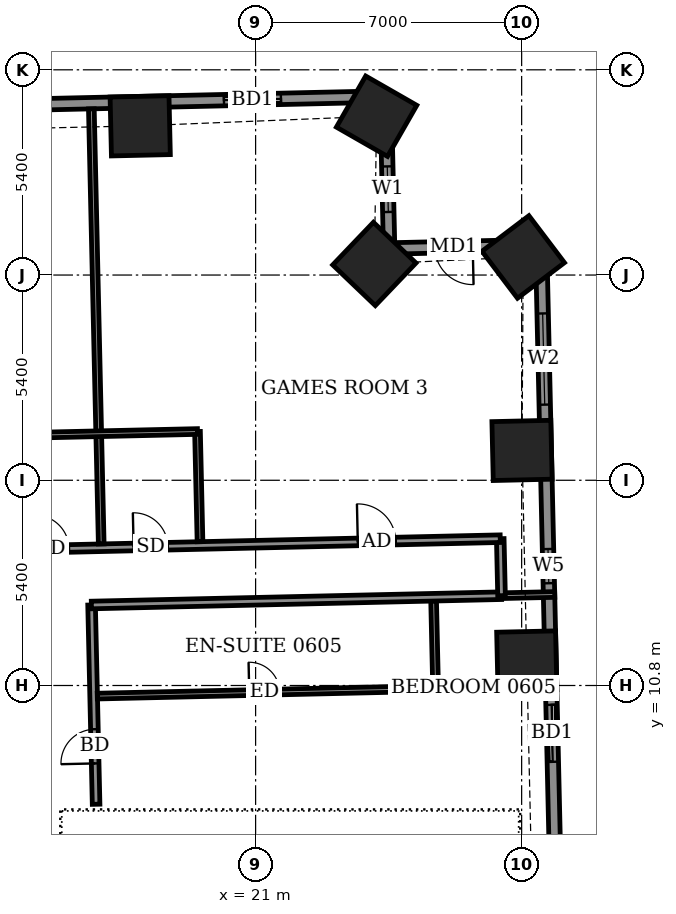
"""IFC4 building model, lengths in metres.
Left out: names, types, materials, properties, quantities, classifications, styles, units other than length and angle.
Written with IfcOpenShell. Run it as: python <this file> out.ifc"""

import sys

from ifc_helpers import new_model, si_unit, direction, frame, frame_2d, origin, origin_2d, place, context, subcontext, project, spatial, rectangle, extrude, element, fill, save


model = new_model("IFC4")
c1 = context("Model", 3, precision=1e-05, world=origin(), true_north=direction((0.0, 1.0)))
c2 = subcontext(c1, "Body", "Model", "MODEL_VIEW")
j1 = project(units=[si_unit("LENGTHUNIT", "METRE"), si_unit("PLANEANGLEUNIT", "RADIAN")], contexts=[c1])
p1 = place(None, origin())
s1 = spatial("IfcSite", under=j1, at=p1, CompositionType="ELEMENT")
p2 = place(p1, origin())
s2 = spatial("IfcBuilding", under=s1, at=p2, CompositionType="ELEMENT")
p3 = place(p2, frame((0.0, 0.0, 29.5)))
s3 = spatial("IfcBuildingStorey", under=s2, at=p3, CompositionType="ELEMENT", Elevation=29.5)
for number, where, z_axis, x_axis in (
    (1, (28.135, 11.444, -0.55), (0.0, 0.0, 1.0), (-0.023, 1.0, 0.0)),
    (2, (28.01, 16.985, -0.55), (0.0, 0.0, 1.0), (-0.023, 1.0, 0.0)),
    (3, (28.041, 22.075, -0.55), (0.0, 0.0, 1.0), (-0.604, 0.797, 0.0)),
    (4, (24.125, 21.892, -0.55), (0.0, 0.0, 1.0), (-0.723, 0.691, 0.0)),
    (5, (24.184, 25.779, -0.55), (0.0, 0.0, 1.0), (-0.868, 0.497, 0.0)),
    (6, (17.964, 25.526, -0.55), (0.0, 0.0, 1.0), (-1.0, -0.023, 0.0)),
):
    element("IfcColumn", number, at=place(p3, frame(where, z_axis=z_axis, x_axis=x_axis)), inside=s3, PredefinedType="COLUMN", context=c2, shape_type="SweptSolid", body=[
        extrude(rectangle(XDim=1.55, YDim=1.55, at=origin_2d()), origin(), (0.0, 0.0, 1.0), 4.6),
    ])
p4 = place(p3, frame((28.887, 5.864, 0.0), z_axis=(0.0, 0.0, 1.0), x_axis=(-0.022687182773, 0.999742612745, 0.0)))
e7 = element("IfcWall", 7, at=p4, inside=s3, PredefinedType="SOLIDWALL", context=c2, shape_type="SweptSolid", body=[
    extrude(rectangle(XDim=16.529, YDim=0.3, at=frame_2d((8.265, 0.0))), origin(), (0.0, 0.0, 1.0), 4.05),
])
p5 = place(p4, frame((2.929, 0.0, 0.0)))
e8 = element("IfcOpeningElement", 8, at=p5, cuts=e7, PredefinedType="OPENING", context=c2, shape_type="SweptSolid", body=[
    extrude(rectangle(XDim=1.5, YDim=2.4, at=frame_2d((0.75, 1.2))), frame((0.0, 0.16, 0.0), z_axis=(0.0, -1.0, 0.0), x_axis=(1.0, 0.0, 0.0)), (0.0, 0.0, 1.0), 0.32),
])
p6 = place(p4, frame((7.629, 0.0, 0.9)))
e9 = element("IfcOpeningElement", 9, at=p6, cuts=e7, PredefinedType="OPENING", context=c2, shape_type="SweptSolid", body=[
    extrude(rectangle(XDim=0.9, YDim=1.5, at=frame_2d((0.45, 0.75))), frame((0.0, 0.16, 0.0), z_axis=(0.0, -1.0, 0.0), x_axis=(1.0, 0.0, 0.0)), (0.0, 0.0, 1.0), 0.32),
])
p7 = place(p4, frame((12.329, 0.0, 0.9)))
e10 = element("IfcOpeningElement", 10, at=p7, cuts=e7, PredefinedType="OPENING", context=c2, shape_type="SweptSolid", body=[
    extrude(rectangle(XDim=2.4, YDim=1.5, at=frame_2d((1.2, 0.75))), frame((0.0, 0.16, 0.0), z_axis=(0.0, -1.0, 0.0), x_axis=(1.0, 0.0, 0.0)), (0.0, 0.0, 1.0), 0.32),
])
p8 = place(p3, frame((28.512, 22.389, 0.0), z_axis=(0.0, 0.0, 1.0), x_axis=(-0.999747725427, -0.022460754759, 0.0)))
e11 = element("IfcWall", 11, at=p8, inside=s3, PredefinedType="SOLIDWALL", context=c2, shape_type="SweptSolid", body=[
    extrude(rectangle(XDim=4.0, YDim=0.3, at=frame_2d((2.0, 0.0))), origin(), (0.0, 0.0, 1.0), 3.55),
])
p9 = place(p8, frame((1.8, 0.0, 0.0)))
e12 = element("IfcOpeningElement", 12, at=p9, cuts=e11, PredefinedType="OPENING", context=c2, shape_type="SweptSolid", body=[
    extrude(rectangle(XDim=1.0, YDim=2.1, at=frame_2d((0.5, 1.05))), frame((0.0, 0.16, 0.0), z_axis=(0.0, -1.0, 0.0), x_axis=(1.0, 0.0, 0.0)), (0.0, 0.0, 1.0), 0.32),
])
p10 = place(p3, frame((24.513, 22.299, 0.0), z_axis=(0.0, 0.0, 1.0), x_axis=(-0.022460754759, 0.999747725427, 0.0)))
e13 = element("IfcWall", 13, at=p10, inside=s3, PredefinedType="SOLIDWALL", context=c2, shape_type="SweptSolid", body=[
    extrude(rectangle(XDim=4.0, YDim=0.3, at=frame_2d((2.0, 0.0))), origin(), (0.0, 0.0, 1.0), 3.55),
])
p11 = place(p10, frame((0.96, 0.0, 0.9)))
e14 = element("IfcOpeningElement", 14, at=p11, cuts=e13, PredefinedType="OPENING", context=c2, shape_type="SweptSolid", body=[
    extrude(rectangle(XDim=1.2, YDim=1.5, at=frame_2d((0.6, 0.75))), frame((0.0, 0.16, 0.0), z_axis=(0.0, -1.0, 0.0), x_axis=(1.0, 0.0, 0.0)), (0.0, 0.0, 1.0), 0.32),
])
p12 = place(p3, frame((24.423, 26.298, 0.0), z_axis=(0.0, 0.0, 1.0), x_axis=(-0.999742433108, -0.022695097355, 0.0)))
e15 = element("IfcWall", 15, at=p12, inside=s3, PredefinedType="SOLIDWALL", context=c2, shape_type="SweptSolid", body=[
    extrude(rectangle(XDim=52.701, YDim=0.3, at=frame_2d((26.35, 0.0))), origin(), (0.0, 0.0, 1.0), 4.05),
])
p13 = place(p12, frame((2.757, 0.0, 0.0)))
e16 = element("IfcOpeningElement", 16, at=p13, cuts=e15, PredefinedType="OPENING", context=c2, shape_type="SweptSolid", body=[
    extrude(rectangle(XDim=1.5, YDim=2.4, at=frame_2d((0.75, 1.2))), frame((0.0, 0.16, 0.0), z_axis=(0.0, -1.0, 0.0), x_axis=(1.0, 0.0, 0.0)), (0.0, 0.0, 1.0), 0.32),
])
p14 = place(p12, frame((8.937, 0.0, 0.9)))
e17 = element("IfcOpeningElement", 17, at=p14, cuts=e15, PredefinedType="OPENING", context=c2, shape_type="SweptSolid", body=[
    extrude(rectangle(XDim=2.4, YDim=1.5, at=frame_2d((1.2, 0.75))), frame((0.0, 0.16, 0.0), z_axis=(0.0, -1.0, 0.0), x_axis=(1.0, 0.0, 0.0)), (0.0, 0.0, 1.0), 0.32),
])
p15 = place(p12, frame((16.675, 0.0, 0.0)))
e18 = element("IfcOpeningElement", 18, at=p15, cuts=e15, PredefinedType="OPENING", context=c2, shape_type="SweptSolid", body=[
    extrude(rectangle(XDim=1.5, YDim=2.4, at=frame_2d((0.75, 1.2))), frame((0.0, 0.16, 0.0), z_axis=(0.0, -1.0, 0.0), x_axis=(1.0, 0.0, 0.0)), (0.0, 0.0, 1.0), 0.32),
])
p16 = place(p12, frame((22.5, 0.0, 0.0)))
e19 = element("IfcOpeningElement", 19, at=p16, cuts=e15, PredefinedType="OPENING", context=c2, shape_type="SweptSolid", body=[
    extrude(rectangle(XDim=1.5, YDim=2.4, at=frame_2d((0.75, 1.2))), frame((0.0, 0.16, 0.0), z_axis=(0.0, -1.0, 0.0), x_axis=(1.0, 0.0, 0.0)), (0.0, 0.0, 1.0), 0.32),
])
p17 = place(p12, frame((28.113, 0.0, 0.0)))
e20 = element("IfcOpeningElement", 20, at=p17, cuts=e15, PredefinedType="OPENING", context=c2, shape_type="SweptSolid", body=[
    extrude(rectangle(XDim=1.5, YDim=2.4, at=frame_2d((0.75, 1.2))), frame((0.0, 0.16, 0.0), z_axis=(0.0, -1.0, 0.0), x_axis=(1.0, 0.0, 0.0)), (0.0, 0.0, 1.0), 0.32),
])
p18 = place(p12, frame((34.1, 0.0, 0.9)))
e21 = element("IfcOpeningElement", 21, at=p18, cuts=e15, PredefinedType="OPENING", context=c2, shape_type="SweptSolid", body=[
    extrude(rectangle(XDim=2.4, YDim=1.5, at=frame_2d((1.2, 0.75))), frame((0.0, 0.16, 0.0), z_axis=(0.0, -1.0, 0.0), x_axis=(1.0, 0.0, 0.0)), (0.0, 0.0, 1.0), 0.32),
])
p19 = place(p12, frame((41.363, 0.0, 0.9)))
e22 = element("IfcOpeningElement", 22, at=p19, cuts=e15, PredefinedType="OPENING", context=c2, shape_type="SweptSolid", body=[
    extrude(rectangle(XDim=2.4, YDim=1.5, at=frame_2d((1.2, 0.75))), frame((0.0, 0.16, 0.0), z_axis=(0.0, -1.0, 0.0), x_axis=(1.0, 0.0, 0.0)), (0.0, 0.0, 1.0), 0.32),
])
p20 = place(p12, frame((47.965, 0.0, 0.9)))
e23 = element("IfcOpeningElement", 23, at=p20, cuts=e15, PredefinedType="OPENING", context=c2, shape_type="SweptSolid", body=[
    extrude(rectangle(XDim=2.4, YDim=1.5, at=frame_2d((1.2, 0.75))), frame((0.0, 0.16, 0.0), z_axis=(0.0, -1.0, 0.0), x_axis=(1.0, 0.0, 0.0)), (0.0, 0.0, 1.0), 0.32),
])
p21 = place(p3, frame((30.037, 19.073, 0.0), z_axis=(0.0, 0.0, 1.0), x_axis=(-0.022600979566, 0.999744565238, 0.0)))
e24 = element("IfcWall", 24, at=p21, inside=s3, PredefinedType="USERDEFINED", context=c2, shape_type="SweptSolid", body=[
    extrude(rectangle(XDim=3.5, YDim=0.55, at=frame_2d((1.75, 0.0))), origin(), (0.0, 0.0, 1.0), 0.8),
])
p22 = place(p3, frame((28.3, 30.313, 0.0), z_axis=(0.0, 0.0, 1.0), x_axis=(0.707106781187, -0.707106781187, 0.0)))
e25 = element("IfcWall", 25, at=p22, inside=s3, PredefinedType="USERDEFINED", context=c2, shape_type="SweptSolid", body=[
    extrude(rectangle(XDim=10.201, YDim=0.55, at=frame_2d((5.1, 0.0))), origin(), (0.0, 0.0, 1.0), 0.8),
])
p23 = place(p3, frame((16.803, 7.675, 0.0), z_axis=(0.0, 0.0, 1.0), x_axis=(-0.022667483124, 0.999743059595, 0.0)))
e26 = element("IfcWall", 26, at=p23, inside=s3, PredefinedType="PARTITIONING", context=c2, shape_type="SweptSolid", body=[
    extrude(rectangle(XDim=5.245, YDim=0.2, at=frame_2d((2.623, 0.0))), origin(), (0.0, 0.0, 1.0), 4.05),
])
p24 = place(p23, frame((1.075, 0.0, 0.0)))
e27 = element("IfcOpeningElement", 27, at=p24, cuts=e26, PredefinedType="OPENING", context=c2, shape_type="SweptSolid", body=[
    extrude(rectangle(XDim=0.9, YDim=2.1, at=frame_2d((0.45, 1.05))), frame((0.0, 0.11, 0.0), z_axis=(0.0, -1.0, 0.0), x_axis=(1.0, 0.0, 0.0)), (0.0, 0.0, 1.0), 0.22),
])
p25 = place(p3, frame((16.834, 10.521, 0.0), z_axis=(0.0, 0.0, 1.0), x_axis=(0.999742599783, 0.022687753966, 0.0)))
e28 = element("IfcWall", 28, at=p25, inside=s3, PredefinedType="PARTITIONING", context=c2, shape_type="SweptSolid", body=[
    extrude(rectangle(XDim=8.899, YDim=0.15, at=frame_2d((4.45, 0.0))), origin(), (0.0, 0.0, 1.0), 4.05),
])
p26 = place(p25, frame((4.0, 0.0, 0.0)))
e29 = element("IfcOpeningElement", 29, at=p26, cuts=e28, PredefinedType="OPENING", context=c2, shape_type="SweptSolid", body=[
    extrude(rectangle(XDim=0.8, YDim=2.1, at=frame_2d((0.4, 1.05))), frame((0.0, 0.085, 0.0), z_axis=(0.0, -1.0, 0.0), x_axis=(1.0, 0.0, 0.0)), (0.0, 0.0, 1.0), 0.17),
])
p27 = place(p3, frame((25.736, 10.723, 0.0), z_axis=(0.0, 0.0, 1.0), x_axis=(-0.022603288534, 0.999744513037, 0.0)))
e30 = element("IfcWall", 30, at=p27, inside=s3, PredefinedType="PARTITIONING", context=c2, shape_type="SweptSolid", body=[
    extrude(rectangle(XDim=2.301, YDim=0.15, at=frame_2d((1.15, 0.0))), origin(), (0.0, 0.0, 1.0), 4.05),
])
p28 = place(p3, frame((16.679, 12.918, 0.0), z_axis=(0.0, 0.0, 1.0), x_axis=(0.999742162372, 0.022707020428, 0.0)))
e31 = element("IfcWall", 31, at=p28, inside=s3, PredefinedType="PARTITIONING", context=c2, shape_type="SweptSolid", body=[
    extrude(rectangle(XDim=10.795, YDim=0.2, at=frame_2d((5.397, 0.0))), origin(), (0.0, 0.0, 1.0), 4.05),
])
p29 = place(p3, frame((27.471, 13.163, 0.0), z_axis=(0.0, 0.0, 1.0), x_axis=(0.999739219063, 0.022836240226, 0.0)))
e32 = element("IfcWall", 32, at=p29, inside=s3, PredefinedType="PARTITIONING", context=c2, shape_type="SweptSolid", body=[
    extrude(rectangle(XDim=1.4, YDim=0.15, at=frame_2d((0.7, 0.0))), origin(), (0.0, 0.0, 1.0), 3.55),
])
p30 = place(p3, frame((27.471, 13.163, 0.0), z_axis=(0.0, 0.0, 1.0), x_axis=(-0.022617910375, 0.999744182344, 0.0)))
e33 = element("IfcWall", 33, at=p30, inside=s3, PredefinedType="PARTITIONING", context=c2, shape_type="SweptSolid", body=[
    extrude(rectangle(XDim=1.5, YDim=0.2, at=frame_2d((0.75, 0.0))), origin(), (0.0, 0.0, 1.0), 4.05),
])
p31 = place(p3, frame((-31.347, 13.329, 0.0), z_axis=(0.0, 0.0, 1.0), x_axis=(0.999742613079, 0.022687168058, 0.0)))
e34 = element("IfcWall", 34, at=p31, inside=s3, PredefinedType="PARTITIONING", context=c2, shape_type="SweptSolid", body=[
    extrude(rectangle(XDim=58.799, YDim=0.2, at=frame_2d((29.399, 0.0))), origin(), (0.0, 0.0, 1.0), 4.05),
])
p32 = place(p31, frame((55.05, 0.0, 0.0)))
e35 = element("IfcOpeningElement", 35, at=p32, cuts=e34, PredefinedType="OPENING", context=c2, shape_type="SweptSolid", body=[
    extrude(rectangle(XDim=1.0, YDim=2.1, at=frame_2d((0.5, 1.05))), frame((0.0, 0.11, 0.0), z_axis=(0.0, -1.0, 0.0), x_axis=(1.0, 0.0, 0.0)), (0.0, 0.0, 1.0), 0.22),
])
p33 = place(p31, frame((49.15, 0.0, 0.0)))
e36 = element("IfcOpeningElement", 36, at=p33, cuts=e34, PredefinedType="OPENING", context=c2, shape_type="SweptSolid", body=[
    extrude(rectangle(XDim=0.9, YDim=2.1, at=frame_2d((0.45, 1.05))), frame((0.0, 0.11, 0.0), z_axis=(0.0, -1.0, 0.0), x_axis=(1.0, 0.0, 0.0)), (0.0, 0.0, 1.0), 0.22),
])
p34 = place(p31, frame((42.55, 0.0, 0.0)))
e37 = element("IfcOpeningElement", 37, at=p34, cuts=e34, PredefinedType="OPENING", context=c2, shape_type="SweptSolid", body=[
    extrude(rectangle(XDim=1.0, YDim=2.1, at=frame_2d((0.5, 1.05))), frame((0.0, 0.11, 0.0), z_axis=(0.0, -1.0, 0.0), x_axis=(1.0, 0.0, 0.0)), (0.0, 0.0, 1.0), 0.22),
])
p35 = place(p31, frame((46.55, 0.0, 0.0)))
e38 = element("IfcOpeningElement", 38, at=p35, cuts=e34, PredefinedType="OPENING", context=c2, shape_type="SweptSolid", body=[
    extrude(rectangle(XDim=0.9, YDim=2.1, at=frame_2d((0.45, 1.05))), frame((0.0, 0.11, 0.0), z_axis=(0.0, -1.0, 0.0), x_axis=(1.0, 0.0, 0.0)), (0.0, 0.0, 1.0), 0.22),
])
p36 = place(p31, frame((38.625, 0.0, 0.0)))
e39 = element("IfcOpeningElement", 39, at=p36, cuts=e34, PredefinedType="OPENING", context=c2, shape_type="SweptSolid", body=[
    extrude(rectangle(XDim=0.9, YDim=2.1, at=frame_2d((0.45, 1.05))), frame((0.0, 0.11, 0.0), z_axis=(0.0, -1.0, 0.0), x_axis=(1.0, 0.0, 0.0)), (0.0, 0.0, 1.0), 0.22),
])
p37 = place(p31, frame((31.15, 0.0, 0.0)))
e40 = element("IfcOpeningElement", 40, at=p37, cuts=e34, PredefinedType="OPENING", context=c2, shape_type="SweptSolid", body=[
    extrude(rectangle(XDim=0.9, YDim=2.1, at=frame_2d((0.45, 1.05))), frame((0.0, 0.11, 0.0), z_axis=(0.0, -1.0, 0.0), x_axis=(1.0, 0.0, 0.0)), (0.0, 0.0, 1.0), 0.22),
])
p38 = place(p31, frame((28.475, 0.0, 0.0)))
e41 = element("IfcOpeningElement", 41, at=p38, cuts=e34, PredefinedType="OPENING", context=c2, shape_type="SweptSolid", body=[
    extrude(rectangle(XDim=0.9, YDim=2.1, at=frame_2d((0.45, 1.05))), frame((0.0, 0.11, 0.0), z_axis=(0.0, -1.0, 0.0), x_axis=(1.0, 0.0, 0.0)), (0.0, 0.0, 1.0), 0.22),
])
p39 = place(p31, frame((21.6, 0.0, 0.0)))
e42 = element("IfcOpeningElement", 42, at=p39, cuts=e34, PredefinedType="OPENING", context=c2, shape_type="SweptSolid", body=[
    extrude(rectangle(XDim=1.0, YDim=2.1, at=frame_2d((0.5, 1.05))), frame((0.0, 0.11, 0.0), z_axis=(0.0, -1.0, 0.0), x_axis=(1.0, 0.0, 0.0)), (0.0, 0.0, 1.0), 0.22),
])
p40 = place(p31, frame((15.85, 0.0, 0.0)))
e43 = element("IfcOpeningElement", 43, at=p40, cuts=e34, PredefinedType="OPENING", context=c2, shape_type="SweptSolid", body=[
    extrude(rectangle(XDim=1.0, YDim=2.1, at=frame_2d((0.5, 1.05))), frame((0.0, 0.11, 0.0), z_axis=(0.0, -1.0, 0.0), x_axis=(1.0, 0.0, 0.0)), (0.0, 0.0, 1.0), 0.22),
])
p41 = place(p31, frame((11.95, 0.0, 0.0)))
e44 = element("IfcOpeningElement", 44, at=p41, cuts=e34, PredefinedType="OPENING", context=c2, shape_type="SweptSolid", body=[
    extrude(rectangle(XDim=0.9, YDim=2.1, at=frame_2d((0.45, 1.05))), frame((0.0, 0.11, 0.0), z_axis=(0.0, -1.0, 0.0), x_axis=(1.0, 0.0, 0.0)), (0.0, 0.0, 1.0), 0.22),
])
p42 = place(p31, frame((3.15, 0.0, 0.0)))
e45 = element("IfcOpeningElement", 45, at=p42, cuts=e34, PredefinedType="OPENING", context=c2, shape_type="SweptSolid", body=[
    extrude(rectangle(XDim=1.0, YDim=2.1, at=frame_2d((0.5, 1.05))), frame((0.0, 0.11, 0.0), z_axis=(0.0, -1.0, 0.0), x_axis=(1.0, 0.0, 0.0)), (0.0, 0.0, 1.0), 0.22),
])
p43 = place(p31, frame((9.45, 0.0, 0.0)))
e46 = element("IfcOpeningElement", 46, at=p43, cuts=e34, PredefinedType="OPENING", context=c2, shape_type="SweptSolid", body=[
    extrude(rectangle(XDim=0.9, YDim=2.1, at=frame_2d((0.45, 1.05))), frame((0.0, 0.11, 0.0), z_axis=(0.0, -1.0, 0.0), x_axis=(1.0, 0.0, 0.0)), (0.0, 0.0, 1.0), 0.22),
])
p44 = place(p3, frame((16.938, 14.525, 0.0), z_axis=(0.0, 0.0, 1.0), x_axis=(-0.022708327922, 0.999742132674, 0.0)))
e47 = element("IfcWall", 47, at=p44, inside=s3, PredefinedType="PARTITIONING", context=c2, shape_type="SweptSolid", body=[
    extrude(rectangle(XDim=11.45, YDim=0.15, at=frame_2d((5.725, 0.0))), origin(), (0.0, 0.0, 1.0), 3.55),
])
p45 = place(p3, frame((19.537, 14.584, 0.0), z_axis=(0.0, 0.0, 1.0), x_axis=(-0.022817032779, 0.999739657619, 0.0)))
e48 = element("IfcWall", 48, at=p45, inside=s3, PredefinedType="PARTITIONING", context=c2, shape_type="SweptSolid", body=[
    extrude(rectangle(XDim=2.9, YDim=0.15, at=frame_2d((1.45, 0.0))), origin(), (0.0, 0.0, 1.0), 4.05),
])
p46 = place(p3, frame((14.273, 17.365, 0.0), z_axis=(0.0, 0.0, 1.0), x_axis=(0.999742780105, 0.022679806622, 0.0)))
e49 = element("IfcWall", 49, at=p46, inside=s3, PredefinedType="PARTITIONING", context=c2, shape_type="SweptSolid", body=[
    extrude(rectangle(XDim=5.199, YDim=0.15, at=frame_2d((2.6, 0.0))), origin(), (0.0, 0.0, 1.0), 4.05),
])
p47 = place(p5, origin())
e50 = element("IfcDoor", 50, at=p47, inside=s3, OperationType="SLIDING_TO_LEFT", PredefinedType="DOOR", context=c2, shape_type="SweptSolid", body=[
    extrude(rectangle(XDim=1.5, YDim=2.4, at=frame_2d((0.75, 1.2))), frame((0.0, 0.025, 0.0), z_axis=(0.0, -1.0, 0.0), x_axis=(1.0, 0.0, 0.0)), (0.0, 0.0, 1.0), 0.05),
])
fill(e8, e50)
p48 = place(p6, origin())
e51 = element("IfcWindow", 51, at=p48, inside=s3, PartitioningType="SINGLE_PANEL", PredefinedType="WINDOW", context=c2, shape_type="SweptSolid", body=[
    extrude(rectangle(XDim=0.9, YDim=1.5, at=frame_2d((0.45, 0.75))), frame((0.0, 0.03, 0.0), z_axis=(0.0, -1.0, 0.0), x_axis=(1.0, 0.0, 0.0)), (0.0, 0.0, 1.0), 0.06),
])
fill(e9, e51)
p49 = place(p7, origin())
e52 = element("IfcWindow", 52, at=p49, inside=s3, PartitioningType="DOUBLE_PANEL_VERTICAL", PredefinedType="WINDOW", context=c2, shape_type="SweptSolid", body=[
    extrude(rectangle(XDim=2.4, YDim=1.5, at=frame_2d((1.2, 0.75))), frame((0.0, 0.03, 0.0), z_axis=(0.0, -1.0, 0.0), x_axis=(1.0, 0.0, 0.0)), (0.0, 0.0, 1.0), 0.06),
])
fill(e10, e52)
p50 = place(p9, origin())
e53 = element("IfcDoor", 53, at=p50, inside=s3, OperationType="SINGLE_SWING_LEFT", PredefinedType="DOOR", context=c2, shape_type="SweptSolid", body=[
    extrude(rectangle(XDim=1.0, YDim=2.1, at=frame_2d((0.5, 1.05))), frame((0.0, 0.025, 0.0), z_axis=(0.0, -1.0, 0.0), x_axis=(1.0, 0.0, 0.0)), (0.0, 0.0, 1.0), 0.05),
])
fill(e12, e53)
p51 = place(p11, origin())
e54 = element("IfcWindow", 54, at=p51, inside=s3, PartitioningType="SINGLE_PANEL", PredefinedType="WINDOW", context=c2, shape_type="SweptSolid", body=[
    extrude(rectangle(XDim=1.2, YDim=1.5, at=frame_2d((0.6, 0.75))), frame((0.0, 0.03, 0.0), z_axis=(0.0, -1.0, 0.0), x_axis=(1.0, 0.0, 0.0)), (0.0, 0.0, 1.0), 0.06),
])
fill(e14, e54)
p52 = place(p13, origin())
e55 = element("IfcDoor", 55, at=p52, inside=s3, OperationType="SLIDING_TO_LEFT", PredefinedType="DOOR", context=c2, shape_type="SweptSolid", body=[
    extrude(rectangle(XDim=1.5, YDim=2.4, at=frame_2d((0.75, 1.2))), frame((0.0, 0.025, 0.0), z_axis=(0.0, -1.0, 0.0), x_axis=(1.0, 0.0, 0.0)), (0.0, 0.0, 1.0), 0.05),
])
fill(e16, e55)
p53 = place(p24, origin())
e56 = element("IfcDoor", 56, at=p53, inside=s3, OperationType="SINGLE_SWING_LEFT", PredefinedType="DOOR", context=c2, shape_type="SweptSolid", body=[
    extrude(rectangle(XDim=0.9, YDim=2.1, at=frame_2d((0.45, 1.05))), frame((0.0, 0.025, 0.0), z_axis=(0.0, -1.0, 0.0), x_axis=(1.0, 0.0, 0.0)), (0.0, 0.0, 1.0), 0.05),
])
fill(e27, e56)
p54 = place(p26, origin())
e57 = element("IfcDoor", 57, at=p54, inside=s3, OperationType="SINGLE_SWING_LEFT", PredefinedType="DOOR", context=c2, shape_type="SweptSolid", body=[
    extrude(rectangle(XDim=0.8, YDim=2.1, at=frame_2d((0.4, 1.05))), frame((0.0, 0.025, 0.0), z_axis=(0.0, -1.0, 0.0), x_axis=(1.0, 0.0, 0.0)), (0.0, 0.0, 1.0), 0.05),
])
fill(e29, e57)
p55 = place(p32, origin())
e58 = element("IfcDoor", 58, at=p55, inside=s3, OperationType="SINGLE_SWING_RIGHT", PredefinedType="DOOR", context=c2, shape_type="SweptSolid", body=[
    extrude(rectangle(XDim=1.0, YDim=2.1, at=frame_2d((0.5, 1.05))), frame((0.0, 0.025, 0.0), z_axis=(0.0, -1.0, 0.0), x_axis=(1.0, 0.0, 0.0)), (0.0, 0.0, 1.0), 0.05),
])
fill(e35, e58)
p56 = place(p33, origin())
e59 = element("IfcDoor", 59, at=p56, inside=s3, OperationType="SINGLE_SWING_LEFT", PredefinedType="DOOR", context=c2, shape_type="SweptSolid", body=[
    extrude(rectangle(XDim=0.9, YDim=2.1, at=frame_2d((0.45, 1.05))), frame((0.0, 0.025, 0.0), z_axis=(0.0, -1.0, 0.0), x_axis=(1.0, 0.0, 0.0)), (0.0, 0.0, 1.0), 0.05),
])
fill(e36, e59)
p57 = place(p35, origin())
e60 = element("IfcDoor", 60, at=p57, inside=s3, OperationType="SINGLE_SWING_RIGHT", PredefinedType="DOOR", context=c2, shape_type="SweptSolid", body=[
    extrude(rectangle(XDim=0.9, YDim=2.1, at=frame_2d((0.45, 1.05))), frame((0.0, 0.025, 0.0), z_axis=(0.0, -1.0, 0.0), x_axis=(1.0, 0.0, 0.0)), (0.0, 0.0, 1.0), 0.05),
])
fill(e38, e60)
save(model, sys.argv[1])
